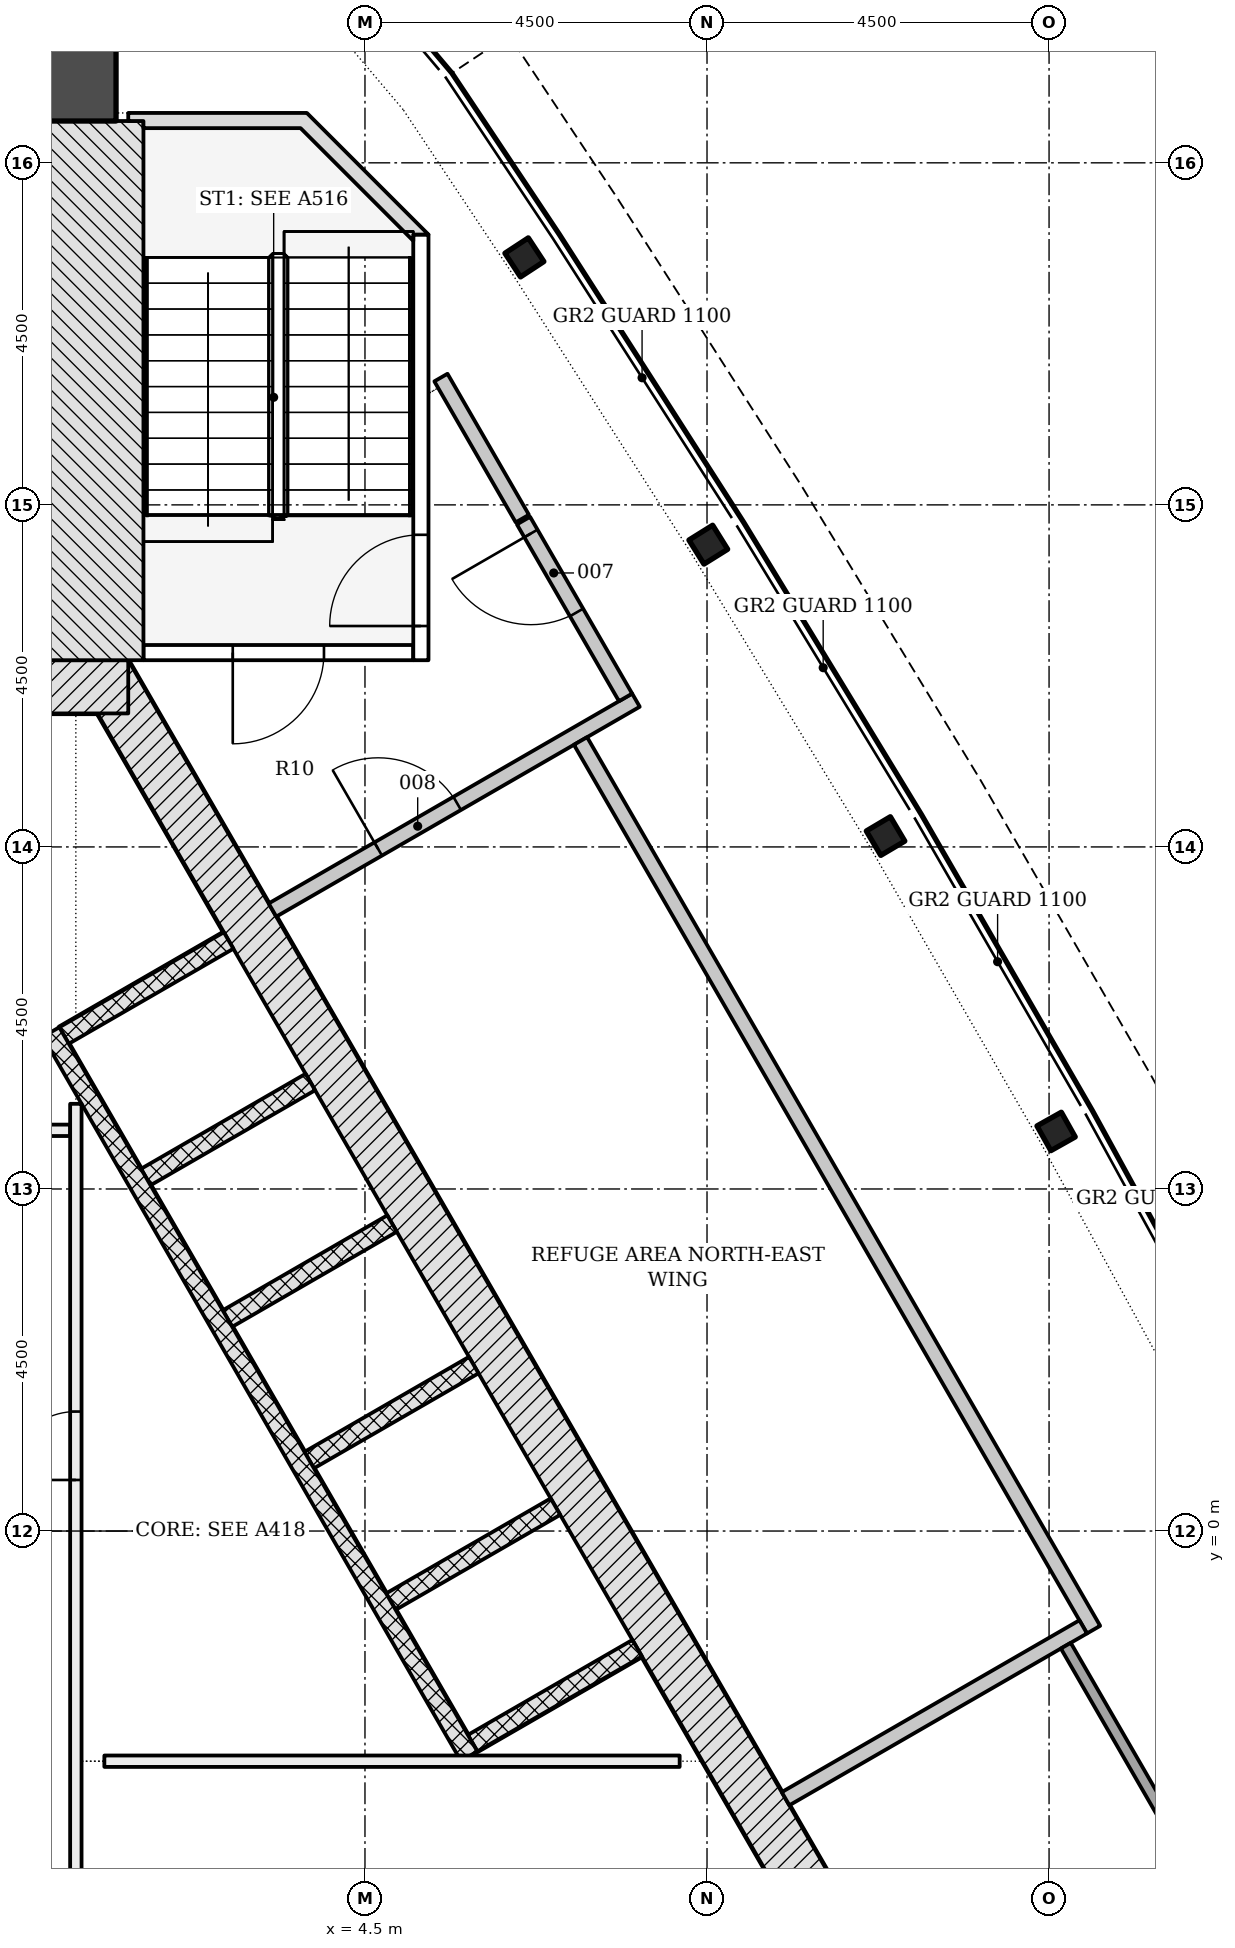
"""IFC4 building model, lengths in metres.
Left out: names, types, materials, properties, quantities, classifications, styles, units other than length and angle.
Written with IfcOpenShell. Run it as: python <this file> out.ifc"""

import sys

from ifc_helpers import new_model, si_unit, direction, frame, frame_2d, origin, origin_2d, place, context, subcontext, project, spatial, polyline, rectangle, i_section, outline, extrude, element, fill, save


model = new_model("IFC4")
c1 = context("Model", 3, precision=1e-05, world=origin(), true_north=direction((0.0, 1.0)))
c2 = subcontext(c1, "Body", "Model", "MODEL_VIEW")
j1 = project(units=[si_unit("LENGTHUNIT", "METRE"), si_unit("PLANEANGLEUNIT", "RADIAN")], contexts=[c1])
p1 = place(None, origin())
s1 = spatial("IfcSite", under=j1, at=p1, CompositionType="ELEMENT")
p2 = place(p1, origin())
s2 = spatial("IfcBuilding", under=s1, at=p2, CompositionType="ELEMENT")
p3 = place(p2, frame((0.0, 0.0, 250.8)))
s3 = spatial("IfcBuildingStorey", under=s2, at=p3, CompositionType="ELEMENT", Elevation=250.8)
p4 = place(p3, frame((8.926, -6.753, -0.3), z_axis=(0.0, 0.0, 1.0), x_axis=(0.500042739161, 0.866000726912, 0.0)))
e1 = element("IfcWall", 1, at=p4, inside=s3, PredefinedType="SHEAR", context=c2, shape_type="SweptSolid", body=[
    extrude(rectangle(XDim=2.771, YDim=0.7, at=frame_2d((1.386, 0.0))), origin(), (0.0, 0.0, 1.0), 7.2),
])
p5 = place(p3, frame((10.311, -4.703, -0.3), z_axis=(0.0, 0.0, 1.0), x_axis=(-0.500001446645, 0.866024568562, 0.0)))
e2 = element("IfcWall", 2, at=p5, inside=s3, PredefinedType="SHEAR", context=c2, shape_type="SweptSolid", body=[
    extrude(rectangle(XDim=18.458, YDim=0.7, at=frame_2d((9.229, 0.0))), origin(), (0.0, 0.0, 1.0), 7.2),
])
p6 = place(p3, frame((1.386, 11.106, -0.3), z_axis=(0.0, 0.0, 1.0), x_axis=(-1.0, 0.0, 0.0)))
e3 = element("IfcWall", 3, at=p6, inside=s3, PredefinedType="SHEAR", context=c2, shape_type="SweptSolid", body=[
    extrude(rectangle(XDim=2.771, YDim=0.7, at=frame_2d((1.386, 0.0))), origin(), (0.0, 0.0, 1.0), 7.2),
])
p7 = place(p3, frame((0.0, 19.775, -0.3), z_axis=(0.0, 0.0, 1.0), x_axis=(0.0, 1.0, 0.0)))
e4 = element("IfcColumn", 4, at=p7, inside=s3, PredefinedType="COLUMN", context=c2, shape_type="SweptSolid", body=[
    extrude(rectangle(XDim=2.45, YDim=2.45, at=origin_2d()), origin(), (0.0, 0.0, 1.0), 7.2),
])
for number, where, z_axis, x_axis in (
    (5, (13.593, 5.257, -0.3), (0.0, 0.0, 1.0), (-0.49, 0.872, 0.0)),
    (6, (11.349, 9.143, -0.3), (0.0, 0.0, 1.0), (-0.51, 0.86, 0.0)),
    (7, (9.017, 12.977, -0.3), (0.0, 0.0, 1.0), (-0.529, 0.848, 0.0)),
    (8, (6.597, 16.756, -0.3), (0.0, 0.0, 1.0), (-0.549, 0.836, 0.0)),
):
    element("IfcColumn", number, at=place(p3, frame(where, z_axis=z_axis, x_axis=x_axis)), inside=s3, PredefinedType="COLUMN", context=c2, shape_type="SweptSolid", body=[
        extrude(i_section(OverallWidth=0.373, OverallDepth=0.368, WebThickness=0.015, FlangeThickness=0.024, FilletRadius=0.015, at=origin_2d()), origin(), (0.0, 0.0, 1.0), 7.2),
    ])
for number, where, z_axis, x_axis in (
    (9, (8.081, -1.541, -0.3), (0.0, 0.0, 1.0), (-0.866, -0.5, 0.0)),
    (10, (7.006, 0.321, -0.3), (0.0, 0.0, 1.0), (-0.866, -0.5, 0.0)),
):
    element("IfcWall", number, at=place(p3, frame(where, z_axis=z_axis, x_axis=x_axis)), inside=s3, PredefinedType="PARTITIONING", context=c2, shape_type="SweptSolid", body=[
        extrude(rectangle(XDim=2.5, YDim=0.25, at=frame_2d((1.25, 0.0))), origin(), (0.0, 0.0, 1.0), 7.2),
    ])
p8 = place(p3, frame((5.931, 2.183, -0.3), z_axis=(0.0, 0.0, 1.0), x_axis=(-0.866047370643, -0.499961950354, 0.0)))
e11 = element("IfcWall", 11, at=p8, inside=s3, PredefinedType="PARTITIONING", context=c2, shape_type="SweptSolid", body=[
    extrude(rectangle(XDim=2.5, YDim=0.25, at=frame_2d((1.25, 0.0))), origin(), (0.0, 0.0, 1.0), 7.2),
])
for number, where, z_axis, x_axis in (
    (12, (4.856, 4.045, -0.3), (0.0, 0.0, 1.0), (-0.866, -0.5, 0.0)),
    (13, (3.781, 5.907, -0.3), (0.0, 0.0, 1.0), (-0.866, -0.5, 0.0)),
    (14, (2.706, 7.769, -0.3), (0.0, 0.0, 1.0), (-0.866, -0.5, 0.0)),
):
    element("IfcWall", number, at=place(p3, frame(where, z_axis=z_axis, x_axis=x_axis)), inside=s3, PredefinedType="PARTITIONING", context=c2, shape_type="SweptSolid", body=[
        extrude(rectangle(XDim=2.5, YDim=0.25, at=frame_2d((1.25, 0.0))), origin(), (0.0, 0.0, 1.0), 7.2),
    ])
p9 = place(p3, frame((5.87, -2.961, 0.0), z_axis=(0.0, 0.0, 1.0), x_axis=(-0.50000615651, 0.866021849293, 0.0)))
e15 = element("IfcWall", 15, at=p9, inside=s3, PredefinedType="PARTITIONING", context=c2, shape_type="SweptSolid", body=[
    extrude(rectangle(XDim=11.0, YDim=0.25, at=frame_2d((5.5, 0.0))), origin(), (0.0, 0.0, 1.0), 6.9),
])
p10 = place(p3, frame((-0.679, 5.272, 0.0), z_axis=(0.0, 0.0, 1.0), x_axis=(1.0, 0.0, 0.0)))
e16 = element("IfcWall", 16, at=p10, inside=s3, PredefinedType="PARTITIONING", context=c2, shape_type="SweptSolid", body=[
    extrude(rectangle(XDim=1.3, YDim=0.15, at=frame_2d((0.65, 0.0))), origin(), (0.0, 0.0, 1.0), 6.9),
])
p11 = place(p3, frame((0.696, -5.928, 0.0), z_axis=(0.0, 0.0, 1.0), x_axis=(0.0, 1.0, 0.0)))
e17 = element("IfcWall", 17, at=p11, inside=s3, PredefinedType="PARTITIONING", context=c2, shape_type="SweptSolid", body=[
    extrude(rectangle(XDim=11.549, YDim=0.15, at=frame_2d((5.774, 0.0))), origin(), (0.0, 0.0, 1.0), 6.9),
])
p12 = place(p11, frame((6.6, 0.0, 0.0)))
e18 = element("IfcOpeningElement", 18, at=p12, cuts=e17, PredefinedType="OPENING", context=c2, shape_type="SweptSolid", body=[
    extrude(rectangle(XDim=0.9, YDim=2.1, at=frame_2d((0.45, 1.05))), frame((0.0, 0.085, 0.0), z_axis=(0.0, -1.0, 0.0), x_axis=(1.0, 0.0, 0.0)), (0.0, 0.0, 1.0), 0.17),
])
p13 = place(p3, frame((1.071, -3.028, 0.0), z_axis=(0.0, 0.0, 1.0), x_axis=(1.0, 0.0, 0.0)))
e19 = element("IfcWall", 19, at=p13, inside=s3, PredefinedType="PARTITIONING", context=c2, shape_type="SweptSolid", body=[
    extrude(rectangle(XDim=7.569, YDim=0.15, at=frame_2d((3.784, 0.0))), origin(), (0.0, 0.0, 1.0), 6.9),
])
p14 = place(p3, frame((5.135, 11.556, -0.3), z_axis=(0.0, 0.0, 1.0), x_axis=(-1.0, 0.0, 0.0)))
e20 = element("IfcWall", 20, at=p14, inside=s3, PredefinedType="SHEAR", context=c2, shape_type="SweptSolid", body=[
    extrude(rectangle(XDim=3.55, YDim=0.2, at=frame_2d((1.775, 0.0))), origin(), (0.0, 0.0, 1.0), 7.2),
])
p15 = place(p14, frame((1.175, 0.0, 0.3)))
e21 = element("IfcOpeningElement", 21, at=p15, cuts=e20, PredefinedType="OPENING", context=c2, shape_type="SweptSolid", body=[
    extrude(rectangle(XDim=1.2, YDim=2.1, at=frame_2d((0.6, 1.05))), frame((0.0, 0.11, 0.0), z_axis=(0.0, -1.0, 0.0), x_axis=(1.0, 0.0, 0.0)), (0.0, 0.0, 1.0), 0.22),
])
p16 = place(p3, frame((5.236, 11.456, -0.3), z_axis=(0.0, 0.0, 1.0), x_axis=(0.0, 1.0, 0.0)))
e22 = element("IfcWall", 22, at=p16, inside=s3, PredefinedType="SHEAR", context=c2, shape_type="SweptSolid", body=[
    extrude(rectangle(XDim=5.6, YDim=0.2, at=frame_2d((2.8, 0.0))), origin(), (0.0, 0.0, 1.0), 7.2),
])
p17 = place(p16, frame((0.45, 0.0, 0.3)))
e23 = element("IfcOpeningElement", 23, at=p17, cuts=e22, PredefinedType="OPENING", context=c2, shape_type="SweptSolid", body=[
    extrude(rectangle(XDim=1.2, YDim=2.1, at=frame_2d((0.6, 1.05))), frame((0.0, 0.11, 0.0), z_axis=(0.0, -1.0, 0.0), x_axis=(1.0, 0.0, 0.0)), (0.0, 0.0, 1.0), 0.22),
])
p18 = place(p3, frame((0.943, 11.456, -0.3), z_axis=(0.0, 0.0, 1.0), x_axis=(0.0, 1.0, 0.0)))
e24 = element("IfcWall", 24, at=p18, inside=s3, PredefinedType="SHEAR", context=c2, shape_type="SweptSolid", body=[
    extrude(rectangle(XDim=7.094, YDim=1.286, at=frame_2d((3.547, 0.0))), origin(), (0.0, 0.0, 1.0), 7.2),
])
p19 = place(p3, frame((0.0, 0.0, -0.3)))
e25 = element("IfcWall", 25, at=p19, inside=s3, PredefinedType="SHEAR", context=c2, shape_type="SweptSolid", body=[
    extrude(outline(polyline([(5.336, 17.056), (3.736, 18.656), (1.385, 18.656), (1.385, 18.55), (1.586, 18.55), (1.586, 18.55), (1.586, 18.55), (1.586, 18.55), (1.586, 18.55), (1.586, 18.55), (1.586, 18.55), (1.586, 18.55), (1.586, 18.55), (1.586, 18.55), (1.586, 18.55), (1.586, 18.55), (1.586, 18.55), (1.586, 18.55), (1.586, 18.55), (1.586, 18.55), (1.586, 18.55), (1.586, 18.456), (3.653, 18.456), (5.135, 16.974), (5.135, 17.056), (5.135, 17.056), (5.135, 17.056), (5.135, 17.056), (5.135, 17.056), (5.135, 17.056), (5.135, 17.056), (5.135, 17.056), (5.135, 17.056), (5.135, 17.056), (5.135, 17.056), (5.135, 17.056), (5.135, 17.056), (5.135, 17.056), (5.135, 17.056), (5.135, 17.056), (5.135, 17.056), (5.336, 17.056)])), origin(), (0.0, 0.0, 1.0), 7.2),
])
p20 = place(p3, frame((3.283, 8.17, 0.0), z_axis=(0.0, 0.0, 1.0), x_axis=(0.866036119804, 0.49998143885, 0.0)))
e26 = element("IfcWall", 26, at=p20, inside=s3, PredefinedType="PARTITIONING", context=c2, shape_type="SweptSolid", body=[
    extrude(rectangle(XDim=5.522, YDim=0.2, at=frame_2d((2.761, 0.0))), origin(), (0.0, 0.0, 1.0), 6.9),
])
p21 = place(p20, frame((1.606, 0.0, 0.0)))
e27 = element("IfcOpeningElement", 27, at=p21, cuts=e26, PredefinedType="OPENING", context=c2, shape_type="SweptSolid", body=[
    extrude(rectangle(XDim=1.2, YDim=2.1, at=frame_2d((0.6, 1.05))), frame((0.0, 0.11, 0.0), z_axis=(0.0, -1.0, 0.0), x_axis=(1.0, 0.0, 0.0)), (0.0, 0.0, 1.0), 0.22),
])
p22 = place(p3, frame((7.336, 10.394, 0.0), z_axis=(0.0, 0.0, 1.0), x_axis=(0.499997969693, -0.866026575979, 0.0)))
e28 = element("IfcWall", 28, at=p22, inside=s3, PredefinedType="PARTITIONING", context=c2, shape_type="SweptSolid", body=[
    extrude(rectangle(XDim=13.5, YDim=0.2, at=frame_2d((6.75, 0.0))), origin(), (0.0, 0.0, 1.0), 6.352),
])
p23 = place(p3, frame((7.929, 10.967, 0.0), z_axis=(0.0, 0.0, 1.0), x_axis=(-0.500039812592, 0.866002416754, 0.0)))
e29 = element("IfcWall", 29, at=p23, inside=s3, PredefinedType="PARTITIONING", context=c2, shape_type="SweptSolid", body=[
    extrude(rectangle(XDim=2.686, YDim=0.2, at=frame_2d((1.343, 0.0))), origin(), (0.0, 0.0, 1.0), 6.352),
])
p24 = place(p23, frame((1.29, 0.0, 0.0)))
e30 = element("IfcOpeningElement", 30, at=p24, cuts=e29, PredefinedType="OPENING", context=c2, shape_type="SweptSolid", body=[
    extrude(rectangle(XDim=1.2, YDim=2.1, at=frame_2d((0.6, 1.05))), frame((0.0, 0.11, 0.0), z_axis=(0.0, -1.0, 0.0), x_axis=(1.0, 0.0, 0.0)), (0.0, 0.0, 1.0), 0.22),
])
p25 = place(p3, frame((6.57, 13.32, 0.0), z_axis=(0.0, 0.0, 1.0), x_axis=(-0.499975665259, 0.866039452998, 0.0)))
e31 = element("IfcWall", 31, at=p25, inside=s3, PredefinedType="PARTITIONING", context=c2, shape_type="SweptSolid", body=[
    extrude(rectangle(XDim=2.142, YDim=0.2, at=frame_2d((1.071, 0.0))), origin(), (0.0, 0.0, 1.0), 6.9),
])
p26 = place(p3, frame((10.033, -3.521, 0.0), z_axis=(0.0, 0.0, 1.0), x_axis=(0.866041729639, 0.499971721724, 0.0)))
e32 = element("IfcWall", 32, at=p26, inside=s3, PredefinedType="PARTITIONING", context=c2, shape_type="SweptSolid", body=[
    extrude(rectangle(XDim=4.522, YDim=0.2, at=frame_2d((2.261, 0.0))), origin(), (0.0, 0.0, 1.0), 6.9),
])
p27 = place(p3, frame((13.72, -1.508, 0.0), z_axis=(0.0, 0.0, 1.0), x_axis=(0.500020560727, -0.866013532718, 0.0)))
e33 = element("IfcWall", 33, at=p27, inside=s3, PredefinedType="PARTITIONING", context=c2, shape_type="SweptSolid", body=[
    extrude(rectangle(XDim=5.175, YDim=0.15, at=frame_2d((2.587, 0.0))), origin(), (0.0, 0.0, 1.0), 6.352),
])
p28 = place(p27, frame((2.469, 0.0, 0.0)))
e34 = element("IfcOpeningElement", 34, at=p28, cuts=e33, PredefinedType="OPENING", context=c2, shape_type="SweptSolid", body=[
    extrude(rectangle(XDim=1.0, YDim=2.1, at=frame_2d((0.5, 1.05))), frame((0.0, 0.085, 0.0), z_axis=(0.0, -1.0, 0.0), x_axis=(1.0, 0.0, 0.0)), (0.0, 0.0, 1.0), 0.17),
])
p29 = place(p12, origin())
e35 = element("IfcDoor", 35, at=p29, inside=s3, OperationType="SINGLE_SWING_LEFT", PredefinedType="DOOR", context=c2, shape_type="SweptSolid", body=[
    extrude(rectangle(XDim=0.9, YDim=2.1, at=frame_2d((0.45, 1.05))), frame((0.0, 0.025, 0.0), z_axis=(0.0, -1.0, 0.0), x_axis=(1.0, 0.0, 0.0)), (0.0, 0.0, 1.0), 0.05),
])
fill(e18, e35)
p30 = place(p15, origin())
e36 = element("IfcDoor", 36, at=p30, inside=s3, OperationType="SINGLE_SWING_RIGHT", PredefinedType="DOOR", context=c2, shape_type="SweptSolid", body=[
    extrude(rectangle(XDim=1.2, YDim=2.1, at=frame_2d((0.6, 1.05))), frame((0.0, 0.025, 0.0), z_axis=(0.0, -1.0, 0.0), x_axis=(1.0, 0.0, 0.0)), (0.0, 0.0, 1.0), 0.05),
])
fill(e21, e36)
p31 = place(p17, origin())
e37 = element("IfcDoor", 37, at=p31, inside=s3, OperationType="SINGLE_SWING_LEFT", PredefinedType="DOOR", context=c2, shape_type="SweptSolid", body=[
    extrude(rectangle(XDim=1.2, YDim=2.1, at=frame_2d((0.6, 1.05))), frame((0.0, 0.025, 0.0), z_axis=(0.0, -1.0, 0.0), x_axis=(1.0, 0.0, 0.0)), (0.0, 0.0, 1.0), 0.05),
])
fill(e23, e37)
p32 = place(p24, origin())
e38 = element("IfcDoor", 38, at=p32, inside=s3, OperationType="SINGLE_SWING_RIGHT", PredefinedType="DOOR", context=c2, shape_type="SweptSolid", body=[
    extrude(rectangle(XDim=1.2, YDim=2.1, at=frame_2d((0.6, 1.05))), frame((0.0, 0.025, 0.0), z_axis=(0.0, -1.0, 0.0), x_axis=(1.0, 0.0, 0.0)), (0.0, 0.0, 1.0), 0.05),
])
fill(e30, e38)
p33 = place(p21, origin())
e39 = element("IfcDoor", 39, at=p33, inside=s3, OperationType="SINGLE_SWING_LEFT", PredefinedType="DOOR", context=c2, shape_type="SweptSolid", body=[
    extrude(rectangle(XDim=1.2, YDim=2.1, at=frame_2d((0.6, 1.05))), frame((0.0, 0.025, 0.0), z_axis=(0.0, -1.0, 0.0), x_axis=(1.0, 0.0, 0.0)), (0.0, 0.0, 1.0), 0.05),
])
fill(e27, e39)
save(model, sys.argv[1])
